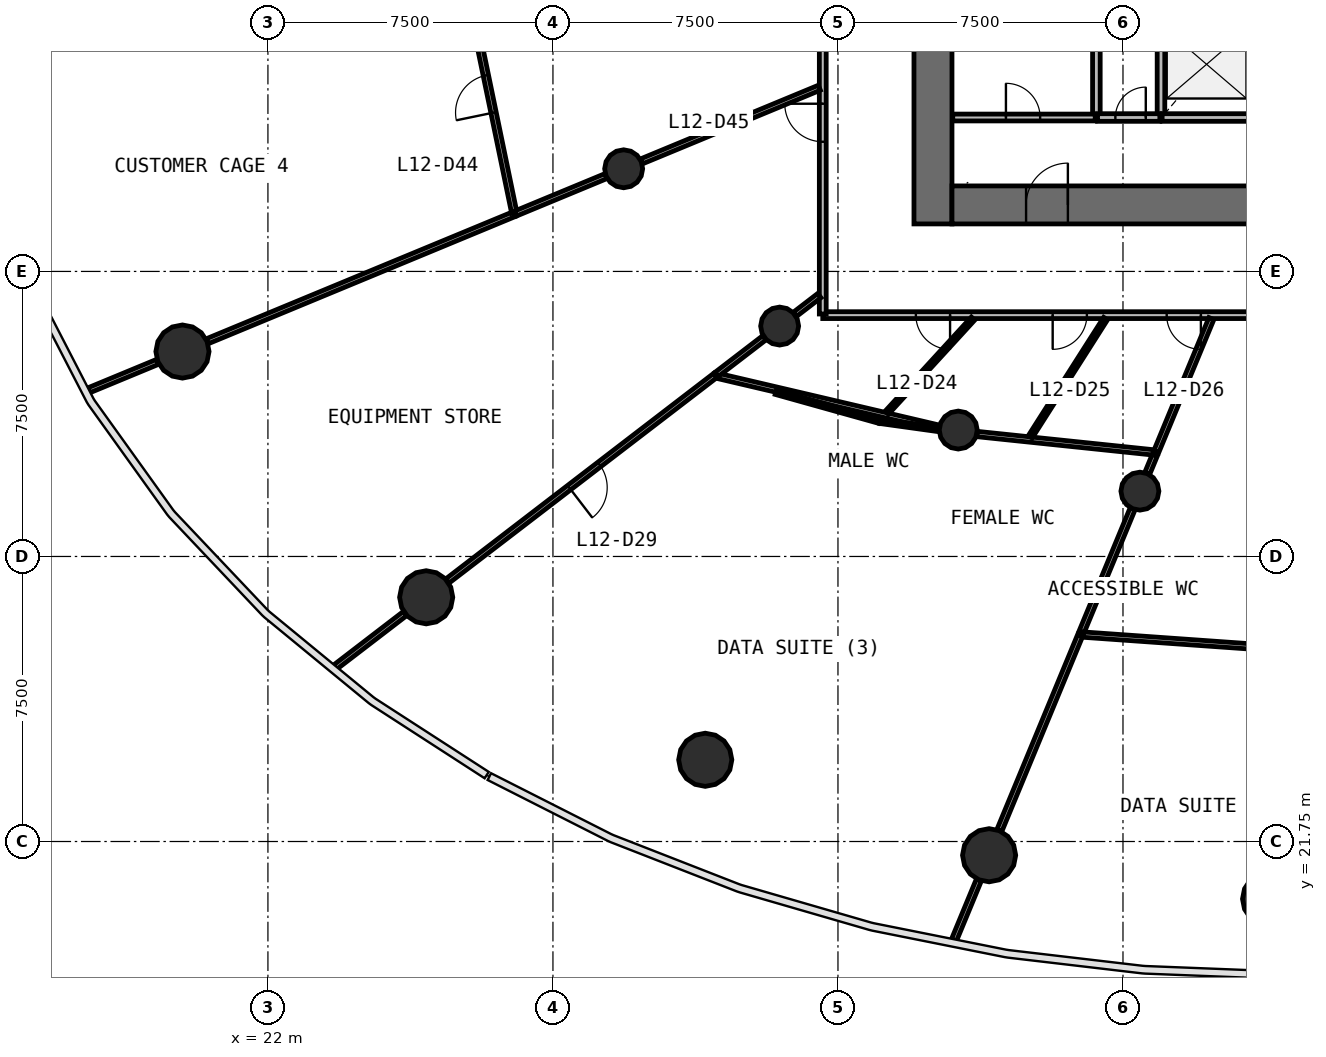
"""IFC4 building model, lengths in metres.
Left out: names, types, materials, properties, quantities, classifications, styles, units other than length and angle.
Written with IfcOpenShell. Run it as: python <this file> out.ifc"""

import sys

from ifc_helpers import new_model, si_unit, direction, frame, frame_2d, origin, origin_2d, place, context, subcontext, project, spatial, rectangle, circle, extrude, source, transform, mapped, element, fill, save


model = new_model("IFC4")
c1 = context("Model", 3, precision=1e-05, world=origin(), true_north=direction((0.0, 1.0)))
c2 = subcontext(c1, "Body", "Model", "MODEL_VIEW")
j1 = project(units=[si_unit("LENGTHUNIT", "METRE"), si_unit("PLANEANGLEUNIT", "RADIAN")], contexts=[c1])
p1 = place(None, origin())
s1 = spatial("IfcSite", under=j1, at=p1, CompositionType="ELEMENT")
p2 = place(p1, origin())
s2 = spatial("IfcBuilding", under=s1, at=p2, CompositionType="ELEMENT")
p3 = place(p2, frame((0.0, 0.0, 53.4)))
s3 = spatial("IfcBuildingStorey", under=s2, at=p3, CompositionType="ELEMENT", Elevation=53.4)
p4 = place(p3, frame((39.5, 58.0, 0.0), z_axis=(0.0, 0.0, 1.0), x_axis=(0.0, -1.0, 0.0)))
e1 = element("IfcWall", 1, at=p4, inside=s3, PredefinedType="SHEAR", context=c2, shape_type="SweptSolid", body=[
    extrude(rectangle(XDim=20.0, YDim=1.0, at=frame_2d((10.0, 0.0))), origin(), (0.0, 0.0, 1.0), 4.4),
])
p5 = place(p4, frame((9.1, 0.0, 0.0)))
e2 = element("IfcOpeningElement", 2, at=p5, cuts=e1, PredefinedType="OPENING", context=c2, shape_type="SweptSolid", body=[
    extrude(rectangle(XDim=1.8, YDim=2.1, at=frame_2d((0.9, 1.05))), frame((0.0, 0.51, 0.0), z_axis=(0.0, -1.0, 0.0), x_axis=(1.0, 0.0, 0.0)), (0.0, 0.0, 1.0), 1.02),
])
p6 = place(p3, frame((40.0, 38.5, 0.0), z_axis=(0.0, 0.0, 1.0), x_axis=(1.0, 0.0, 0.0)))
e3 = element("IfcWall", 3, at=p6, inside=s3, PredefinedType="SHEAR", context=c2, shape_type="SweptSolid", body=[
    extrude(rectangle(XDim=24.0, YDim=1.0, at=frame_2d((12.0, 0.0))), origin(), (0.0, 0.0, 1.0), 4.4),
])
p7 = place(p6, frame((21.45, 0.0, 0.0)))
e4 = element("IfcOpeningElement", 4, at=p7, cuts=e3, PredefinedType="OPENING", context=c2, shape_type="SweptSolid", body=[
    extrude(rectangle(XDim=1.1, YDim=2.1, at=frame_2d((0.55, 1.05))), frame((0.0, 0.51, 0.0), z_axis=(0.0, -1.0, 0.0), x_axis=(1.0, 0.0, 0.0)), (0.0, 0.0, 1.0), 1.02),
])
p8 = place(p6, frame((1.95, 0.0, 0.0)))
e5 = element("IfcOpeningElement", 5, at=p8, cuts=e3, PredefinedType="OPENING", context=c2, shape_type="SweptSolid", body=[
    extrude(rectangle(XDim=1.1, YDim=2.1, at=frame_2d((0.55, 1.05))), frame((0.0, 0.51, 0.0), z_axis=(0.0, -1.0, 0.0), x_axis=(1.0, 0.0, 0.0)), (0.0, 0.0, 1.0), 1.02),
])
m1 = source(origin(), c2, "Body", "SweptSolid", [
    extrude(circle(Radius=0.7, at=origin_2d()), origin(), (0.0, 0.0, 1.0), 4.4),
])
for number, where, z_axis, x_axis in (
    (6, (19.751, 34.642, 0.0), (0.0, 0.0, 1.0), (1.0, 0.0, 0.0)),
    (7, (26.164, 28.176, 0.0), (0.0, 0.0, 1.0), (1.0, 0.0, 0.0)),
    (8, (33.508, 23.9, 0.0), (0.0, 0.0, 1.0), (1.0, 0.0, 0.0)),
    (9, (40.977, 21.389, 0.0), (0.0, 0.0, 1.0), (1.0, 0.0, 0.0)),
    (10, (48.345, 20.239, 0.0), (0.0, 0.0, 1.0), (1.0, 0.0, 0.0)),
):
    element("IfcColumn", number, at=place(p3, frame(where, z_axis=z_axis, x_axis=x_axis)), inside=s3, PredefinedType="COLUMN", context=c2, shape_type="MappedRepresentation", body=[
        mapped(m1, transform((0.0, 0.0, 0.0), scale=1.0)),
    ])
m2 = source(origin(), c2, "Body", "SweptSolid", [
    extrude(circle(Radius=0.5, at=origin_2d()), origin(), (0.0, 0.0, 1.0), 4.4),
])
for number, where, z_axis, x_axis in (
    (11, (31.361, 39.451, 0.0), (0.0, 0.0, 1.0), (1.0, 0.0, 0.0)),
    (12, (35.465, 35.312, 0.0), (0.0, 0.0, 1.0), (1.0, 0.0, 0.0)),
    (13, (40.165, 32.576, 0.0), (0.0, 0.0, 1.0), (1.0, 0.0, 0.0)),
    (14, (44.945, 30.969, 0.0), (0.0, 0.0, 1.0), (1.0, 0.0, 0.0)),
):
    element("IfcColumn", number, at=place(p3, frame(where, z_axis=z_axis, x_axis=x_axis)), inside=s3, PredefinedType="COLUMN", context=c2, shape_type="MappedRepresentation", body=[
        mapped(m2, transform((0.0, 0.0, 0.0), scale=1.0)),
    ])
for number, where, z_axis, x_axis in (
    (15, (43.8, 43.6, 0.0), (0.0, 0.0, 1.0), (0.0, -1.0, 0.0)),
    (16, (45.5, 43.6, 0.0), (0.0, 0.0, 1.0), (0.0, -1.0, 0.0)),
):
    element("IfcWall", number, at=place(p3, frame(where, z_axis=z_axis, x_axis=x_axis)), inside=s3, PredefinedType="SOLIDWALL", context=c2, shape_type="SweptSolid", body=[
        extrude(rectangle(XDim=2.8, YDim=0.2, at=frame_2d((1.4, 0.0))), origin(), (0.0, 0.0, 1.0), 3.95),
    ])
p9 = place(p3, frame((45.53, 40.8, 0.0), z_axis=(0.0, 0.0, 1.0), x_axis=(1.0, 0.0, 0.0)))
e17 = element("IfcWall", 17, at=p9, inside=s3, PredefinedType="SOLIDWALL", context=c2, shape_type="SweptSolid", body=[
    extrude(rectangle(XDim=2.34, YDim=0.2, at=frame_2d((1.17, 0.0))), origin(), (0.0, 0.0, 1.0), 3.95),
])
p10 = place(p3, frame((43.83, 40.8, 0.0), z_axis=(0.0, 0.0, 1.0), x_axis=(1.0, 0.0, 0.0)))
e18 = element("IfcWall", 18, at=p10, inside=s3, PredefinedType="SOLIDWALL", context=c2, shape_type="SweptSolid", body=[
    extrude(rectangle(XDim=1.64, YDim=0.2, at=frame_2d((0.82, 0.0))), origin(), (0.0, 0.0, 1.0), 3.95),
])
p11 = place(p10, frame((0.47, 0.0, 0.0)))
e19 = element("IfcOpeningElement", 19, at=p11, cuts=e18, PredefinedType="OPENING", context=c2, shape_type="SweptSolid", body=[
    extrude(rectangle(XDim=0.8, YDim=2.1, at=frame_2d((0.4, 1.05))), frame((0.0, 0.11, 0.0), z_axis=(0.0, -1.0, 0.0), x_axis=(1.0, 0.0, 0.0)), (0.0, 0.0, 1.0), 0.22),
])
p12 = place(p3, frame((67.4, 35.6, 0.0), z_axis=(0.0, 0.0, 1.0), x_axis=(-1.0, 0.0, 0.0)))
e20 = element("IfcWall", 20, at=p12, inside=s3, PredefinedType="PARTITIONING", context=c2, shape_type="SweptSolid", body=[
    extrude(rectangle(XDim=30.8, YDim=0.18, at=frame_2d((15.4, 0.0))), origin(), (0.0, 0.0, 1.0), 3.05),
])
p13 = place(p12, frame((27.45, 0.0, 0.0)))
e21 = element("IfcOpeningElement", 21, at=p13, cuts=e20, PredefinedType="OPENING", context=c2, shape_type="SweptSolid", body=[
    extrude(rectangle(XDim=0.9, YDim=2.1, at=frame_2d((0.45, 1.05))), frame((0.0, 0.1, 0.0), z_axis=(0.0, -1.0, 0.0), x_axis=(1.0, 0.0, 0.0)), (0.0, 0.0, 1.0), 0.2),
])
p14 = place(p12, frame((23.85, 0.0, 0.0)))
e22 = element("IfcOpeningElement", 22, at=p14, cuts=e20, PredefinedType="OPENING", context=c2, shape_type="SweptSolid", body=[
    extrude(rectangle(XDim=0.9, YDim=2.1, at=frame_2d((0.45, 1.05))), frame((0.0, 0.1, 0.0), z_axis=(0.0, -1.0, 0.0), x_axis=(1.0, 0.0, 0.0)), (0.0, 0.0, 1.0), 0.2),
])
p15 = place(p12, frame((20.85, 0.0, 0.0)))
e23 = element("IfcOpeningElement", 23, at=p15, cuts=e20, PredefinedType="OPENING", context=c2, shape_type="SweptSolid", body=[
    extrude(rectangle(XDim=0.9, YDim=2.1, at=frame_2d((0.45, 1.05))), frame((0.0, 0.1, 0.0), z_axis=(0.0, -1.0, 0.0), x_axis=(1.0, 0.0, 0.0)), (0.0, 0.0, 1.0), 0.2),
])
p16 = place(p12, frame((14.95, 0.0, 0.0)))
e24 = element("IfcOpeningElement", 24, at=p16, cuts=e20, PredefinedType="OPENING", context=c2, shape_type="SweptSolid", body=[
    extrude(rectangle(XDim=1.0, YDim=2.1, at=frame_2d((0.5, 1.05))), frame((0.0, 0.1, 0.0), z_axis=(0.0, -1.0, 0.0), x_axis=(1.0, 0.0, 0.0)), (0.0, 0.0, 1.0), 0.2),
])
p17 = place(p3, frame((36.6, 35.63, 0.0), z_axis=(0.0, 0.0, 1.0), x_axis=(0.0, 1.0, 0.0)))
e25 = element("IfcWall", 25, at=p17, inside=s3, PredefinedType="PARTITIONING", context=c2, shape_type="SweptSolid", body=[
    extrude(rectangle(XDim=23.583, YDim=0.18, at=frame_2d((11.791, 0.0))), origin(), (0.0, 0.0, 1.0), 3.05),
])
p18 = place(p17, frame((11.333, 0.0, 0.0)))
e26 = element("IfcOpeningElement", 26, at=p18, cuts=e25, PredefinedType="OPENING", context=c2, shape_type="SweptSolid", body=[
    extrude(rectangle(XDim=1.0, YDim=2.1, at=frame_2d((0.5, 1.05))), frame((0.0, 0.1, 0.0), z_axis=(0.0, -1.0, 0.0), x_axis=(1.0, 0.0, 0.0)), (0.0, 0.0, 1.0), 0.2),
])
p19 = place(p17, frame((4.532, 0.0, 0.0)))
e27 = element("IfcOpeningElement", 27, at=p19, cuts=e25, PredefinedType="OPENING", context=c2, shape_type="SweptSolid", body=[
    extrude(rectangle(XDim=1.0, YDim=2.1, at=frame_2d((0.5, 1.05))), frame((0.0, 0.1, 0.0), z_axis=(0.0, -1.0, 0.0), x_axis=(1.0, 0.0, 0.0)), (0.0, 0.0, 1.0), 0.2),
])
p20 = place(p3, frame((40.02, 40.8, 0.0), z_axis=(0.0, 0.0, 1.0), x_axis=(1.0, 0.0, 0.0)))
e28 = element("IfcWall", 28, at=p20, inside=s3, PredefinedType="PARTITIONING", context=c2, shape_type="SweptSolid", body=[
    extrude(rectangle(XDim=3.75, YDim=0.18, at=frame_2d((1.875, 0.0))), origin(), (0.0, 0.0, 1.0), 3.95),
])
p21 = place(p20, frame((1.4, 0.0, 0.0)))
e29 = element("IfcOpeningElement", 29, at=p21, cuts=e28, PredefinedType="OPENING", context=c2, shape_type="SweptSolid", body=[
    extrude(rectangle(XDim=0.9, YDim=2.1, at=frame_2d((0.45, 1.05))), frame((0.0, 0.1, 0.0), z_axis=(0.0, -1.0, 0.0), x_axis=(1.0, 0.0, 0.0)), (0.0, 0.0, 1.0), 0.2),
])
p22 = place(p3, frame((33.776, 34.016, 0.0), z_axis=(0.0, 0.0, 1.0), x_axis=(-0.793363616038, -0.608748037161, 0.0)))
e30 = element("IfcWall", 30, at=p22, inside=s3, PredefinedType="PARTITIONING", context=c2, shape_type="SweptSolid", body=[
    extrude(rectangle(XDim=8.889, YDim=0.14, at=frame_2d((4.445, 0.0))), origin(), (0.0, 0.0, 1.0), 3.05),
])
p23 = place(p22, frame((3.85, 0.0, 0.0)))
e31 = element("IfcOpeningElement", 31, at=p23, cuts=e30, PredefinedType="OPENING", context=c2, shape_type="SweptSolid", body=[
    extrude(rectangle(XDim=1.0, YDim=2.1, at=frame_2d((0.5, 1.05))), frame((0.0, 0.08, 0.0), z_axis=(0.0, -1.0, 0.0), x_axis=(1.0, 0.0, 0.0)), (0.0, 0.0, 1.0), 0.16),
])
p24 = place(p3, frame((28.489, 38.261, 0.0), z_axis=(0.0, 0.0, 1.0), x_axis=(-0.923879491354, -0.382683531727, 0.0)))
e32 = element("IfcWall", 32, at=p24, inside=s3, PredefinedType="PARTITIONING", context=c2, shape_type="SweptSolid", body=[
    extrude(rectangle(XDim=8.753, YDim=0.14, at=frame_2d((4.376, 0.0))), origin(), (0.0, 0.0, 1.0), 3.05),
])
p25 = place(p3, frame((28.483, 38.291, 0.0), z_axis=(0.0, 0.0, 1.0), x_axis=(-0.202647546794, 0.979251740758, 0.0)))
e33 = element("IfcWall", 33, at=p25, inside=s3, PredefinedType="PARTITIONING", context=c2, shape_type="SweptSolid", body=[
    extrude(rectangle(XDim=6.544, YDim=0.14, at=frame_2d((3.272, 0.0))), origin(), (0.0, 0.0, 1.0), 3.05),
])
p26 = place(p25, frame((2.694, 0.0, 0.0)))
e34 = element("IfcOpeningElement", 34, at=p26, cuts=e33, PredefinedType="OPENING", context=c2, shape_type="SweptSolid", body=[
    extrude(rectangle(XDim=1.0, YDim=2.1, at=frame_2d((0.5, 1.05))), frame((0.0, 0.08, 0.0), z_axis=(0.0, -1.0, 0.0), x_axis=(1.0, 0.0, 0.0)), (0.0, 0.0, 1.0), 0.16),
])
p27 = place(p3, frame((33.805, 34.009, 0.0), z_axis=(0.0, 0.0, 1.0), x_axis=(0.973632222489, -0.22812342127, 0.0)))
e35 = element("IfcWall", 35, at=p27, inside=s3, PredefinedType="PARTITIONING", context=c2, shape_type="SweptSolid", body=[
    extrude(rectangle(XDim=6.018, YDim=0.14, at=frame_2d((3.009, 0.0))), origin(), (0.0, 0.0, 1.0), 3.05),
])
p28 = place(p3, frame((43.384, 27.199, 0.0), z_axis=(0.0, 0.0, 1.0), x_axis=(0.997508340925, -0.070548634182, 0.0)))
e36 = element("IfcWall", 36, at=p28, inside=s3, PredefinedType="PARTITIONING", context=c2, shape_type="SweptSolid", body=[
    extrude(rectangle(XDim=5.838, YDim=0.14, at=frame_2d((2.919, 0.0))), origin(), (0.0, 0.0, 1.0), 3.05),
])
p29 = place(p3, frame((43.373, 27.171, 0.0), z_axis=(0.0, 0.0, 1.0), x_axis=(-0.382670118501, -0.923885047182, 0.0)))
e37 = element("IfcWall", 37, at=p29, inside=s3, PredefinedType="PARTITIONING", context=c2, shape_type="SweptSolid", body=[
    extrude(rectangle(XDim=5.554, YDim=0.14, at=frame_2d((2.777, 0.0))), origin(), (0.0, 0.0, 1.0), 3.05),
])
p30 = place(p3, frame((36.51, 41.584, 0.0), z_axis=(0.0, 0.0, 1.0), x_axis=(-0.923890025086, -0.382658100067, 0.0)))
e38 = element("IfcWall", 38, at=p30, inside=s3, PredefinedType="PARTITIONING", context=c2, shape_type="SweptSolid", body=[
    extrude(rectangle(XDim=5.068, YDim=0.14, at=frame_2d((2.534, 0.0))), origin(), (0.0, 0.0, 1.0), 3.05),
])
p31 = place(p3, frame((40.659, 32.472, 0.0), z_axis=(0.0, 0.0, 1.0), x_axis=(0.994613201527, -0.103656062762, 0.0)))
e39 = element("IfcWall", 39, at=p31, inside=s3, PredefinedType="PARTITIONING", context=c2, shape_type="SweptSolid", body=[
    extrude(rectangle(XDim=4.732, YDim=0.14, at=frame_2d((2.366, 0.0))), origin(), (0.0, 0.0, 1.0), 3.05),
])
p32 = place(p3, frame((46.826, 35.51, 0.0), z_axis=(0.0, 0.0, 1.0), x_axis=(-0.382683759209, -0.923879397128, 0.0)))
e40 = element("IfcWall", 40, at=p32, inside=s3, PredefinedType="PARTITIONING", context=c2, shape_type="SweptSolid", body=[
    extrude(rectangle(XDim=3.789, YDim=0.14, at=frame_2d((1.895, 0.0))), origin(), (0.0, 0.0, 1.0), 3.05),
])
p33 = place(p3, frame((44.752, 30.502, 0.0), z_axis=(0.0, 0.0, 1.0), x_axis=(-0.382698672088, -0.923873219864, 0.0)))
e41 = element("IfcWall", 41, at=p33, inside=s3, PredefinedType="PARTITIONING", context=c2, shape_type="SweptSolid", body=[
    extrude(rectangle(XDim=3.502, YDim=0.14, at=frame_2d((1.751, 0.0))), origin(), (0.0, 0.0, 1.0), 3.05),
])
p34 = place(p3, frame((30.894, 39.258, 0.0), z_axis=(0.0, 0.0, 1.0), x_axis=(-0.923866506459, -0.382714878523, 0.0)))
e42 = element("IfcWall", 42, at=p34, inside=s3, PredefinedType="PARTITIONING", context=c2, shape_type="SweptSolid", body=[
    extrude(rectangle(XDim=2.573, YDim=0.14, at=frame_2d((1.287, 0.0))), origin(), (0.0, 0.0, 1.0), 3.05),
])
p35 = place(p3, frame((25.606, 27.747, 0.0), z_axis=(0.0, 0.0, 1.0), x_axis=(-0.793384830347, -0.608720388172, 0.0)))
e43 = element("IfcWall", 43, at=p35, inside=s3, PredefinedType="PARTITIONING", context=c2, shape_type="SweptSolid", body=[
    extrude(rectangle(XDim=2.324, YDim=0.14, at=frame_2d((1.162, 0.0))), origin(), (0.0, 0.0, 1.0), 3.05),
])
p36 = place(p3, frame((19.1, 34.372, 0.0), z_axis=(0.0, 0.0, 1.0), x_axis=(-0.923874199787, -0.382696306447, 0.0)))
e44 = element("IfcWall", 44, at=p36, inside=s3, PredefinedType="PARTITIONING", context=c2, shape_type="SweptSolid", body=[
    extrude(rectangle(XDim=1.961, YDim=0.14, at=frame_2d((0.98, 0.0))), origin(), (0.0, 0.0, 1.0), 3.05),
])
p37 = place(p3, frame((40.708, 20.737, 0.0), z_axis=(0.0, 0.0, 1.0), x_axis=(-0.382632674553, -0.923900555452, 0.0)))
e45 = element("IfcWall", 45, at=p37, inside=s3, PredefinedType="PARTITIONING", context=c2, shape_type="SweptSolid", body=[
    extrude(rectangle(XDim=1.714, YDim=0.14, at=frame_2d((0.857, 0.0))), origin(), (0.0, 0.0, 1.0), 3.05),
])
p38 = place(p3, frame((35.065, 35.005, 0.0), z_axis=(0.0, 0.0, 1.0), x_axis=(-0.793286864057, -0.608848052732, 0.0)))
e46 = element("IfcWall", 46, at=p38, inside=s3, PredefinedType="PARTITIONING", context=c2, shape_type="SweptSolid", body=[
    extrude(rectangle(XDim=1.587, YDim=0.14, at=frame_2d((0.793, 0.0))), origin(), (0.0, 0.0, 1.0), 3.05),
])
p39 = place(p3, frame((36.51, 36.114, 0.0), z_axis=(0.0, 0.0, 1.0), x_axis=(-0.793316076519, -0.608809989025, 0.0)))
e47 = element("IfcWall", 47, at=p39, inside=s3, PredefinedType="PARTITIONING", context=c2, shape_type="SweptSolid", body=[
    extrude(rectangle(XDim=0.812, YDim=0.14, at=frame_2d((0.406, 0.0))), origin(), (0.0, 0.0, 1.0), 3.05),
])
p40 = place(p3, frame((45.337, 31.914, 0.0), z_axis=(0.0, 0.0, 1.0), x_axis=(-0.382809221062, -0.923827419094, 0.0)))
e48 = element("IfcWall", 48, at=p40, inside=s3, PredefinedType="PARTITIONING", context=c2, shape_type="SweptSolid", body=[
    extrude(rectangle(XDim=0.519, YDim=0.14, at=frame_2d((0.259, 0.0))), origin(), (0.0, 0.0, 1.0), 3.05),
])
p41 = place(p3, frame((35.364, 33.572, 0.0), z_axis=(0.0, 0.0, 1.0), x_axis=(0.963049305084, -0.269325149172, 0.0)))
e49 = element("IfcWall", 49, at=p41, inside=s3, PredefinedType="PARTITIONING", context=c2, shape_type="SweptSolid", body=[
    extrude(rectangle(XDim=2.823, YDim=0.12, at=frame_2d((1.411, 0.0))), origin(), (0.0, 0.0, 1.0), 3.05),
])
p42 = place(p3, frame((44.043, 35.51, 0.0), z_axis=(0.0, 0.0, 1.0), x_axis=(-0.537273404115, -0.843408139177, 0.0)))
e50 = element("IfcWall", 50, at=p42, inside=s3, PredefinedType="PARTITIONING", context=c2, shape_type="SweptSolid", body=[
    extrude(rectangle(XDim=3.692, YDim=0.12, at=frame_2d((1.846, 0.0))), origin(), (0.0, 0.0, 1.0), 3.05),
])
p43 = place(p3, frame((40.555, 35.51, 0.0), z_axis=(0.0, 0.0, 1.0), x_axis=(-0.675566754316, -0.737298827114, 0.0)))
e51 = element("IfcWall", 51, at=p43, inside=s3, PredefinedType="PARTITIONING", context=c2, shape_type="SweptSolid", body=[
    extrude(rectangle(XDim=3.362, YDim=0.12, at=frame_2d((1.681, 0.0))), origin(), (0.0, 0.0, 1.0), 3.05),
])
p44 = place(p3, frame((38.112, 32.808, 0.0), z_axis=(0.0, 0.0, 1.0), x_axis=(0.990488726007, -0.137593908485, 0.0)))
e52 = element("IfcWall", 52, at=p44, inside=s3, PredefinedType="PARTITIONING", context=c2, shape_type="SweptSolid", body=[
    extrude(rectangle(XDim=1.563, YDim=0.12, at=frame_2d((0.782, 0.0))), origin(), (0.0, 0.0, 1.0), 3.05),
])
m3 = source(origin(), c2, "Body", "SweptSolid", [
    extrude(rectangle(XDim=0.8, YDim=2.1, at=frame_2d((0.4, 1.05))), frame((0.0, 0.025, 0.0), z_axis=(0.0, -1.0, 0.0), x_axis=(1.0, 0.0, 0.0)), (0.0, 0.0, 1.0), 0.05),
])
p45 = place(p11, origin())
e53 = element("IfcDoor", 53, at=p45, inside=s3, OperationType="SINGLE_SWING_RIGHT", PredefinedType="DOOR", context=c2, shape_type="MappedRepresentation", body=[
    mapped(m3, transform((0.0, 0.0, 0.0), scale=1.0)),
])
fill(e19, e53)
m4 = source(origin(), c2, "Body", "SweptSolid", [
    extrude(rectangle(XDim=1.1, YDim=2.1, at=frame_2d((0.55, 1.05))), frame((0.0, 0.025, 0.0), z_axis=(0.0, -1.0, 0.0), x_axis=(1.0, 0.0, 0.0)), (0.0, 0.0, 1.0), 0.05),
])
p46 = place(p8, origin())
e54 = element("IfcDoor", 54, at=p46, inside=s3, OperationType="SINGLE_SWING_RIGHT", PredefinedType="DOOR", context=c2, shape_type="MappedRepresentation", body=[
    mapped(m4, transform((0.0, 0.0, 0.0), scale=1.0)),
])
fill(e5, e54)
m5 = source(origin(), c2, "Body", "SweptSolid", [
    extrude(rectangle(XDim=0.9, YDim=2.1, at=frame_2d((0.45, 1.05))), frame((0.0, 0.025, 0.0), z_axis=(0.0, -1.0, 0.0), x_axis=(1.0, 0.0, 0.0)), (0.0, 0.0, 1.0), 0.05),
])
p47 = place(p13, origin())
e55 = element("IfcDoor", 55, at=p47, inside=s3, OperationType="SINGLE_SWING_LEFT", PredefinedType="DOOR", context=c2, shape_type="MappedRepresentation", body=[
    mapped(m5, transform((0.0, 0.0, 0.0), scale=1.0)),
])
fill(e21, e55)
p48 = place(p14, origin())
e56 = element("IfcDoor", 56, at=p48, inside=s3, OperationType="SINGLE_SWING_RIGHT", PredefinedType="DOOR", context=c2, shape_type="MappedRepresentation", body=[
    mapped(m5, transform((0.0, 0.0, 0.0), scale=1.0)),
])
fill(e22, e56)
p49 = place(p15, origin())
e57 = element("IfcDoor", 57, at=p49, inside=s3, OperationType="SINGLE_SWING_LEFT", PredefinedType="DOOR", context=c2, shape_type="MappedRepresentation", body=[
    mapped(m5, transform((0.0, 0.0, 0.0), scale=1.0)),
])
fill(e23, e57)
m6 = source(origin(), c2, "Body", "SweptSolid", [
    extrude(rectangle(XDim=1.0, YDim=2.1, at=frame_2d((0.5, 1.05))), frame((0.0, 0.025, 0.0), z_axis=(0.0, -1.0, 0.0), x_axis=(1.0, 0.0, 0.0)), (0.0, 0.0, 1.0), 0.05),
])
p50 = place(p23, origin())
e58 = element("IfcDoor", 58, at=p50, inside=s3, OperationType="SINGLE_SWING_RIGHT", PredefinedType="DOOR", context=c2, shape_type="MappedRepresentation", body=[
    mapped(m6, transform((0.0, 0.0, 0.0), scale=1.0)),
])
fill(e31, e58)
p51 = place(p26, origin())
e59 = element("IfcDoor", 59, at=p51, inside=s3, OperationType="SINGLE_SWING_LEFT", PredefinedType="DOOR", context=c2, shape_type="MappedRepresentation", body=[
    mapped(m6, transform((0.0, 0.0, 0.0), scale=1.0)),
])
fill(e34, e59)
p52 = place(p19, origin())
e60 = element("IfcDoor", 60, at=p52, inside=s3, OperationType="SINGLE_SWING_RIGHT", PredefinedType="DOOR", context=c2, shape_type="MappedRepresentation", body=[
    mapped(m6, transform((0.0, 0.0, 0.0), scale=1.0)),
])
fill(e27, e60)
m7 = source(origin(), c2, "Body", "SweptSolid", [
    extrude(rectangle(XDim=0.9, YDim=2.1, at=frame_2d((0.45, 1.05))), frame((0.0, 0.025, 0.0), z_axis=(0.0, -1.0, 0.0), x_axis=(1.0, 0.0, 0.0)), (0.0, 0.0, 1.0), 0.05),
])
p53 = place(p21, origin())
e61 = element("IfcDoor", 61, at=p53, inside=s3, OperationType="SINGLE_SWING_LEFT", PredefinedType="DOOR", context=c2, shape_type="MappedRepresentation", body=[
    mapped(m7, transform((0.0, 0.0, 0.0), scale=1.0)),
])
fill(e29, e61)
save(model, sys.argv[1])
